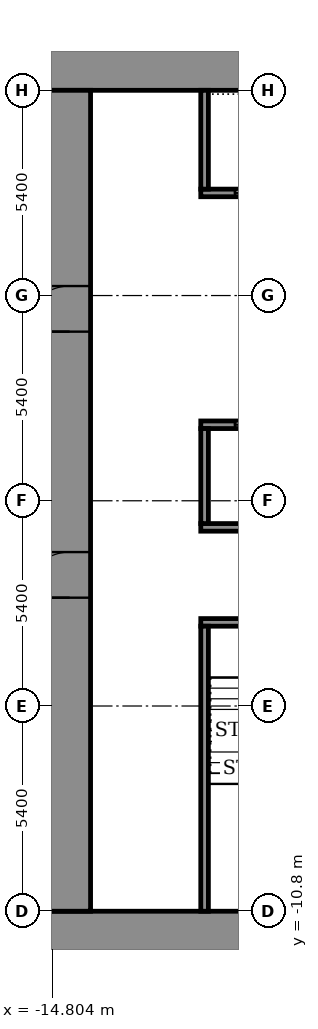
"""IFC4 building model, lengths in metres.
Left out: names, types, materials, properties, quantities, classifications, styles, units other than length and angle.
Written with IfcOpenShell. Run it as: python <this file> out.ifc"""

import sys

from ifc_helpers import new_model, si_unit, direction, frame, frame_2d, origin, place, context, subcontext, project, spatial, rectangle, extrude, element, fill, save


model = new_model("IFC4")
c1 = context("Model", 3, precision=1e-05, world=origin(), true_north=direction((0.0, 1.0)))
c2 = subcontext(c1, "Body", "Model", "MODEL_VIEW")
j1 = project(units=[si_unit("LENGTHUNIT", "METRE"), si_unit("PLANEANGLEUNIT", "RADIAN")], contexts=[c1])
p1 = place(None, origin())
s1 = spatial("IfcSite", under=j1, at=p1, CompositionType="ELEMENT")
p2 = place(p1, origin())
s2 = spatial("IfcBuilding", under=s1, at=p2, CompositionType="ELEMENT")
p3 = place(p2, frame((0.0, 0.0, 44.9)))
s3 = spatial("IfcBuildingStorey", under=s2, at=p3, CompositionType="ELEMENT", Elevation=44.9)
for number, where, z_axis, x_axis in (
    (1, (-14.9, -11.35, 0.0), (0.0, 0.0, 1.0), (1.0, 0.0, 0.0)),
    (2, (-14.9, 11.35, 0.0), (0.0, 0.0, 1.0), (1.0, 0.0, 0.0)),
):
    element("IfcWall", number, at=place(p3, frame(where, z_axis=z_axis, x_axis=x_axis)), inside=s3, PredefinedType="SHEAR", context=c2, shape_type="SweptSolid", body=[
        extrude(rectangle(XDim=29.8, YDim=1.1, at=frame_2d((14.9, 0.0))), origin(), (0.0, 0.0, 1.0), 3.6),
    ])
p4 = place(p3, frame((-14.35, -10.8, 0.0), z_axis=(0.0, 0.0, 1.0), x_axis=(0.0, 1.0, 0.0)))
e3 = element("IfcWall", 3, at=p4, inside=s3, PredefinedType="SHEAR", context=c2, shape_type="SweptSolid", body=[
    extrude(rectangle(XDim=21.6, YDim=1.1, at=frame_2d((10.8, 0.0))), origin(), (0.0, 0.0, 1.0), 3.6),
])
p5 = place(p4, frame((8.25, 0.0, 0.0)))
e4 = element("IfcOpeningElement", 4, at=p5, cuts=e3, PredefinedType="OPENING", context=c2, shape_type="SweptSolid", body=[
    extrude(rectangle(XDim=1.2, YDim=2.1, at=frame_2d((0.6, 1.05))), frame((0.0, 0.56, 0.0), z_axis=(0.0, -1.0, 0.0), x_axis=(1.0, 0.0, 0.0)), (0.0, 0.0, 1.0), 1.12),
])
p6 = place(p4, frame((15.25, 0.0, 0.0)))
e5 = element("IfcOpeningElement", 5, at=p6, cuts=e3, PredefinedType="OPENING", context=c2, shape_type="SweptSolid", body=[
    extrude(rectangle(XDim=1.2, YDim=2.1, at=frame_2d((0.6, 1.05))), frame((0.0, 0.56, 0.0), z_axis=(0.0, -1.0, 0.0), x_axis=(1.0, 0.0, 0.0)), (0.0, 0.0, 1.0), 1.12),
])
p7 = place(p3, frame((-10.9, -3.2, 0.0), z_axis=(0.0, 0.0, 1.0), x_axis=(1.0, 0.0, 0.0)))
e6 = element("IfcWall", 6, at=p7, inside=s3, PredefinedType="SHEAR", context=c2, shape_type="SweptSolid", body=[
    extrude(rectangle(XDim=21.8, YDim=0.2, at=frame_2d((10.9, 0.0))), origin(), (0.0, 0.0, 1.0), 3.05),
])
p8 = place(p7, frame((1.075, 0.0, 0.0)))
e7 = element("IfcOpeningElement", 7, at=p8, cuts=e6, PredefinedType="OPENING", context=c2, shape_type="SweptSolid", body=[
    extrude(rectangle(XDim=1.1, YDim=2.1, at=frame_2d((0.55, 1.05))), frame((0.0, 0.11, 0.0), z_axis=(0.0, -1.0, 0.0), x_axis=(1.0, 0.0, 0.0)), (0.0, 0.0, 1.0), 0.22),
])
p9 = place(p7, frame((10.325, 0.0, 0.0)))
e8 = element("IfcOpeningElement", 8, at=p9, cuts=e6, PredefinedType="OPENING", context=c2, shape_type="SweptSolid", body=[
    extrude(rectangle(XDim=1.1, YDim=2.1, at=frame_2d((0.55, 1.05))), frame((0.0, 0.11, 0.0), z_axis=(0.0, -1.0, 0.0), x_axis=(1.0, 0.0, 0.0)), (0.0, 0.0, 1.0), 0.22),
])
p10 = place(p7, frame((19.625, 0.0, 0.0)))
e9 = element("IfcOpeningElement", 9, at=p10, cuts=e6, PredefinedType="OPENING", context=c2, shape_type="SweptSolid", body=[
    extrude(rectangle(XDim=1.1, YDim=2.1, at=frame_2d((0.55, 1.05))), frame((0.0, 0.11, 0.0), z_axis=(0.0, -1.0, 0.0), x_axis=(1.0, 0.0, 0.0)), (0.0, 0.0, 1.0), 0.22),
])
p11 = place(p7, frame((5.7, 0.0, 0.0)))
e10 = element("IfcOpeningElement", 10, at=p11, cuts=e6, PredefinedType="OPENING", context=c2, shape_type="SweptSolid", body=[
    extrude(rectangle(XDim=1.1, YDim=2.1, at=frame_2d((0.55, 1.05))), frame((0.0, 0.11, 0.0), z_axis=(0.0, -1.0, 0.0), x_axis=(1.0, 0.0, 0.0)), (0.0, 0.0, 1.0), 0.22),
])
p12 = place(p7, frame((14.975, 0.0, 0.0)))
e11 = element("IfcOpeningElement", 11, at=p12, cuts=e6, PredefinedType="OPENING", context=c2, shape_type="SweptSolid", body=[
    extrude(rectangle(XDim=1.1, YDim=2.1, at=frame_2d((0.55, 1.05))), frame((0.0, 0.11, 0.0), z_axis=(0.0, -1.0, 0.0), x_axis=(1.0, 0.0, 0.0)), (0.0, 0.0, 1.0), 0.22),
])
p13 = place(p3, frame((-10.9, -0.7, 0.0), z_axis=(0.0, 0.0, 1.0), x_axis=(1.0, 0.0, 0.0)))
e12 = element("IfcWall", 12, at=p13, inside=s3, PredefinedType="SHEAR", context=c2, shape_type="SweptSolid", body=[
    extrude(rectangle(XDim=21.8, YDim=0.2, at=frame_2d((10.9, 0.0))), origin(), (0.0, 0.0, 1.0), 3.05),
])
p14 = place(p3, frame((-10.9, 2.0, 0.0), z_axis=(0.0, 0.0, 1.0), x_axis=(1.0, 0.0, 0.0)))
e13 = element("IfcWall", 13, at=p14, inside=s3, PredefinedType="SHEAR", context=c2, shape_type="SweptSolid", body=[
    extrude(rectangle(XDim=21.8, YDim=0.2, at=frame_2d((10.9, 0.0))), origin(), (0.0, 0.0, 1.0), 3.05),
])
p15 = place(p14, frame((0.9, 0.0, 0.0)))
e14 = element("IfcOpeningElement", 14, at=p15, cuts=e13, PredefinedType="OPENING", context=c2, shape_type="SweptSolid", body=[
    extrude(rectangle(XDim=1.1, YDim=2.1, at=frame_2d((0.55, 1.05))), frame((0.0, 0.11, 0.0), z_axis=(0.0, -1.0, 0.0), x_axis=(1.0, 0.0, 0.0)), (0.0, 0.0, 1.0), 0.22),
])
p16 = place(p14, frame((3.6, 0.0, 0.0)))
e15 = element("IfcOpeningElement", 15, at=p16, cuts=e13, PredefinedType="OPENING", context=c2, shape_type="SweptSolid", body=[
    extrude(rectangle(XDim=1.1, YDim=2.1, at=frame_2d((0.55, 1.05))), frame((0.0, 0.11, 0.0), z_axis=(0.0, -1.0, 0.0), x_axis=(1.0, 0.0, 0.0)), (0.0, 0.0, 1.0), 0.22),
])
p17 = place(p14, frame((6.3, 0.0, 0.0)))
e16 = element("IfcOpeningElement", 16, at=p17, cuts=e13, PredefinedType="OPENING", context=c2, shape_type="SweptSolid", body=[
    extrude(rectangle(XDim=1.1, YDim=2.1, at=frame_2d((0.55, 1.05))), frame((0.0, 0.11, 0.0), z_axis=(0.0, -1.0, 0.0), x_axis=(1.0, 0.0, 0.0)), (0.0, 0.0, 1.0), 0.22),
])
p18 = place(p14, frame((9.0, 0.0, 0.0)))
e17 = element("IfcOpeningElement", 17, at=p18, cuts=e13, PredefinedType="OPENING", context=c2, shape_type="SweptSolid", body=[
    extrude(rectangle(XDim=1.1, YDim=2.1, at=frame_2d((0.55, 1.05))), frame((0.0, 0.11, 0.0), z_axis=(0.0, -1.0, 0.0), x_axis=(1.0, 0.0, 0.0)), (0.0, 0.0, 1.0), 0.22),
])
p19 = place(p14, frame((11.7, 0.0, 0.0)))
e18 = element("IfcOpeningElement", 18, at=p19, cuts=e13, PredefinedType="OPENING", context=c2, shape_type="SweptSolid", body=[
    extrude(rectangle(XDim=1.1, YDim=2.1, at=frame_2d((0.55, 1.05))), frame((0.0, 0.11, 0.0), z_axis=(0.0, -1.0, 0.0), x_axis=(1.0, 0.0, 0.0)), (0.0, 0.0, 1.0), 0.22),
])
p20 = place(p14, frame((17.2, 0.0, 0.0)))
e19 = element("IfcOpeningElement", 19, at=p20, cuts=e13, PredefinedType="OPENING", context=c2, shape_type="SweptSolid", body=[
    extrude(rectangle(XDim=0.9, YDim=2.1, at=frame_2d((0.45, 1.05))), frame((0.0, 0.11, 0.0), z_axis=(0.0, -1.0, 0.0), x_axis=(1.0, 0.0, 0.0)), (0.0, 0.0, 1.0), 0.22),
])
p21 = place(p3, frame((-10.9, 8.1, 0.0), z_axis=(0.0, 0.0, 1.0), x_axis=(1.0, 0.0, 0.0)))
e20 = element("IfcWall", 20, at=p21, inside=s3, PredefinedType="SHEAR", context=c2, shape_type="SweptSolid", body=[
    extrude(rectangle(XDim=21.8, YDim=0.2, at=frame_2d((10.9, 0.0))), origin(), (0.0, 0.0, 1.0), 3.05),
])
p22 = place(p21, frame((0.9, 0.0, 0.0)))
e21 = element("IfcOpeningElement", 21, at=p22, cuts=e20, PredefinedType="OPENING", context=c2, shape_type="SweptSolid", body=[
    extrude(rectangle(XDim=1.1, YDim=2.1, at=frame_2d((0.55, 1.05))), frame((0.0, 0.11, 0.0), z_axis=(0.0, -1.0, 0.0), x_axis=(1.0, 0.0, 0.0)), (0.0, 0.0, 1.0), 0.22),
])
p23 = place(p21, frame((3.6, 0.0, 0.0)))
e22 = element("IfcOpeningElement", 22, at=p23, cuts=e20, PredefinedType="OPENING", context=c2, shape_type="SweptSolid", body=[
    extrude(rectangle(XDim=1.1, YDim=2.1, at=frame_2d((0.55, 1.05))), frame((0.0, 0.11, 0.0), z_axis=(0.0, -1.0, 0.0), x_axis=(1.0, 0.0, 0.0)), (0.0, 0.0, 1.0), 0.22),
])
p24 = place(p21, frame((6.3, 0.0, 0.0)))
e23 = element("IfcOpeningElement", 23, at=p24, cuts=e20, PredefinedType="OPENING", context=c2, shape_type="SweptSolid", body=[
    extrude(rectangle(XDim=1.1, YDim=2.1, at=frame_2d((0.55, 1.05))), frame((0.0, 0.11, 0.0), z_axis=(0.0, -1.0, 0.0), x_axis=(1.0, 0.0, 0.0)), (0.0, 0.0, 1.0), 0.22),
])
p25 = place(p21, frame((9.0, 0.0, 0.0)))
e24 = element("IfcOpeningElement", 24, at=p25, cuts=e20, PredefinedType="OPENING", context=c2, shape_type="SweptSolid", body=[
    extrude(rectangle(XDim=1.1, YDim=2.1, at=frame_2d((0.55, 1.05))), frame((0.0, 0.11, 0.0), z_axis=(0.0, -1.0, 0.0), x_axis=(1.0, 0.0, 0.0)), (0.0, 0.0, 1.0), 0.22),
])
p26 = place(p21, frame((11.7, 0.0, 0.0)))
e25 = element("IfcOpeningElement", 25, at=p26, cuts=e20, PredefinedType="OPENING", context=c2, shape_type="SweptSolid", body=[
    extrude(rectangle(XDim=1.1, YDim=2.1, at=frame_2d((0.55, 1.05))), frame((0.0, 0.11, 0.0), z_axis=(0.0, -1.0, 0.0), x_axis=(1.0, 0.0, 0.0)), (0.0, 0.0, 1.0), 0.22),
])
p27 = place(p21, frame((14.5, 0.0, 0.0)))
e26 = element("IfcOpeningElement", 26, at=p27, cuts=e20, PredefinedType="OPENING", context=c2, shape_type="SweptSolid", body=[
    extrude(rectangle(XDim=0.9, YDim=2.1, at=frame_2d((0.45, 1.05))), frame((0.0, 0.11, 0.0), z_axis=(0.0, -1.0, 0.0), x_axis=(1.0, 0.0, 0.0)), (0.0, 0.0, 1.0), 0.22),
])
p28 = place(p21, frame((18.55, 0.0, 0.0)))
e27 = element("IfcOpeningElement", 27, at=p28, cuts=e20, PredefinedType="OPENING", context=c2, shape_type="SweptSolid", body=[
    extrude(rectangle(XDim=0.9, YDim=2.1, at=frame_2d((0.45, 1.05))), frame((0.0, 0.11, 0.0), z_axis=(0.0, -1.0, 0.0), x_axis=(1.0, 0.0, 0.0)), (0.0, 0.0, 1.0), 0.22),
])
p29 = place(p3, frame((-10.8, -10.8, 0.0), z_axis=(0.0, 0.0, 1.0), x_axis=(0.0, 1.0, 0.0)))
e28 = element("IfcWall", 28, at=p29, inside=s3, PredefinedType="SHEAR", context=c2, shape_type="SweptSolid", body=[
    extrude(rectangle(XDim=7.5, YDim=0.2, at=frame_2d((3.75, 0.0))), origin(), (0.0, 0.0, 1.0), 3.05),
])
p30 = place(p3, frame((-10.8, -0.6, 0.0), z_axis=(0.0, 0.0, 1.0), x_axis=(0.0, 1.0, 0.0)))
e29 = element("IfcWall", 29, at=p30, inside=s3, PredefinedType="SHEAR", context=c2, shape_type="SweptSolid", body=[
    extrude(rectangle(XDim=2.5, YDim=0.2, at=frame_2d((1.25, 0.0))), origin(), (0.0, 0.0, 1.0), 3.05),
])
p31 = place(p3, frame((-10.8, 8.2, 0.0), z_axis=(0.0, 0.0, 1.0), x_axis=(0.0, 1.0, 0.0)))
e30 = element("IfcWall", 30, at=p31, inside=s3, PredefinedType="SHEAR", context=c2, shape_type="SweptSolid", body=[
    extrude(rectangle(XDim=2.6, YDim=0.2, at=frame_2d((1.3, 0.0))), origin(), (0.0, 0.0, 1.0), 3.05),
])
p32 = place(p5, origin())
e31 = element("IfcDoor", 31, at=p32, inside=s3, OperationType="DOUBLE_DOOR_SINGLE_SWING", PredefinedType="DOOR", context=c2, shape_type="SweptSolid", body=[
    extrude(rectangle(XDim=1.2, YDim=2.1, at=frame_2d((0.6, 1.05))), frame((0.0, 0.025, 0.0), z_axis=(0.0, -1.0, 0.0), x_axis=(1.0, 0.0, 0.0)), (0.0, 0.0, 1.0), 0.05),
])
fill(e4, e31)
p33 = place(p6, origin())
e32 = element("IfcDoor", 32, at=p33, inside=s3, OperationType="DOUBLE_DOOR_SINGLE_SWING", PredefinedType="DOOR", context=c2, shape_type="SweptSolid", body=[
    extrude(rectangle(XDim=1.2, YDim=2.1, at=frame_2d((0.6, 1.05))), frame((0.0, 0.025, 0.0), z_axis=(0.0, -1.0, 0.0), x_axis=(1.0, 0.0, 0.0)), (0.0, 0.0, 1.0), 0.05),
])
fill(e5, e32)
p34 = place(p15, origin())
e33 = element("IfcDoor", 33, at=p34, inside=s3, OperationType="SLIDING_TO_LEFT", PredefinedType="DOOR", context=c2, shape_type="SweptSolid", body=[
    extrude(rectangle(XDim=1.1, YDim=2.1, at=frame_2d((0.55, 1.05))), frame((0.0, 0.025, 0.0), z_axis=(0.0, -1.0, 0.0), x_axis=(1.0, 0.0, 0.0)), (0.0, 0.0, 1.0), 0.05),
])
fill(e14, e33)
p35 = place(p22, origin())
e34 = element("IfcDoor", 34, at=p35, inside=s3, OperationType="SLIDING_TO_LEFT", PredefinedType="DOOR", context=c2, shape_type="SweptSolid", body=[
    extrude(rectangle(XDim=1.1, YDim=2.1, at=frame_2d((0.55, 1.05))), frame((0.0, 0.025, 0.0), z_axis=(0.0, -1.0, 0.0), x_axis=(1.0, 0.0, 0.0)), (0.0, 0.0, 1.0), 0.05),
])
fill(e21, e34)
save(model, sys.argv[1])
